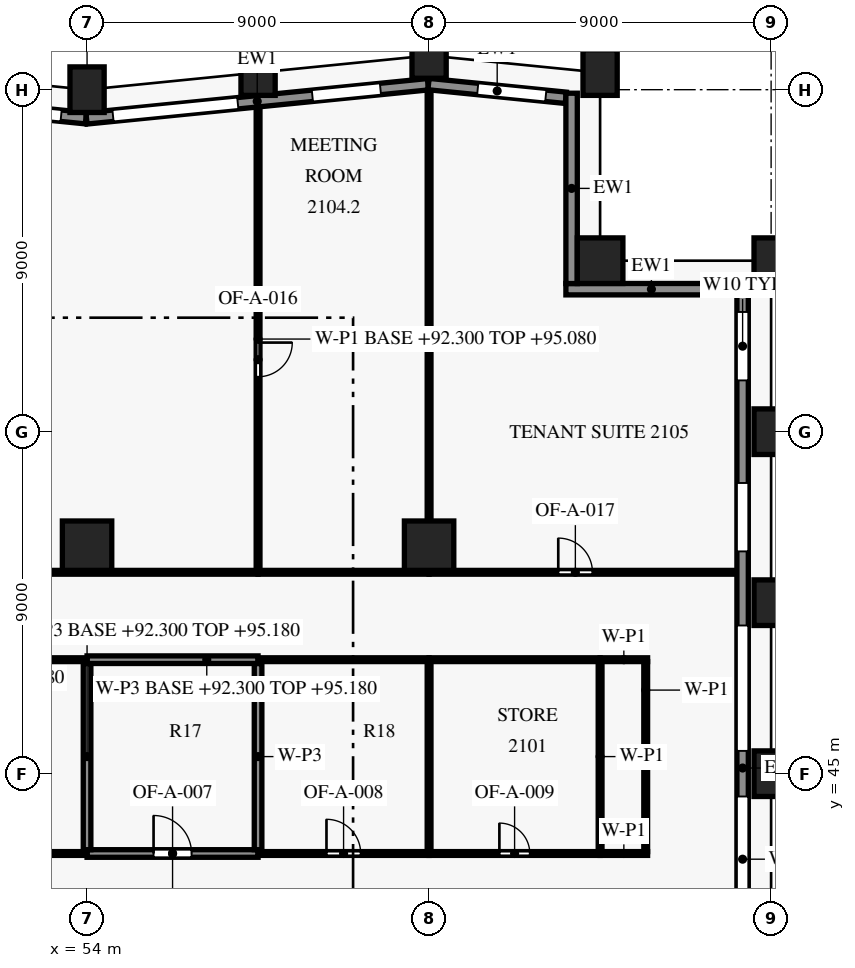
"""IFC4 building model, lengths in metres.
Left out: names, types, materials, properties, quantities, classifications, styles, units other than length and angle.
Written with IfcOpenShell. Run it as: python <this file> out.ifc"""

import sys

from ifc_helpers import new_model, si_unit, direction, frame, frame_2d, origin, origin_2d, place, context, subcontext, project, spatial, rectangle, extrude, element, fill, save


model = new_model("IFC4")
c1 = context("Model", 3, precision=1e-05, world=origin(), true_north=direction((0.0, 1.0)))
c2 = subcontext(c1, "Body", "Model", "MODEL_VIEW")
j1 = project(units=[si_unit("LENGTHUNIT", "METRE"), si_unit("PLANEANGLEUNIT", "RADIAN")], contexts=[c1])
p1 = place(None, origin())
s1 = spatial("IfcSite", under=j1, at=p1, CompositionType="ELEMENT")
p2 = place(p1, origin())
s2 = spatial("IfcBuilding", under=s1, at=p2, CompositionType="ELEMENT")
p3 = place(p2, frame((0.0, 0.0, 92.3)))
s3 = spatial("IfcBuildingStorey", under=s2, at=p3, CompositionType="ELEMENT", Elevation=92.3)
for number, where, z_axis, x_axis in (
    (1, (72.0, 45.0, 0.0), (0.0, 0.0, 1.0), (0.0, 1.0, 0.0)),
    (2, (72.0, 49.5, 0.0), (0.0, 0.0, 1.0), (0.0, 1.0, 0.0)),
    (3, (72.0, 54.0, 0.0), (0.0, 0.0, 1.0), (0.0, 1.0, 0.0)),
    (4, (72.0, 58.5, 0.0), (0.0, 0.0, 1.0), (0.0, 1.0, 0.0)),
    (5, (67.5, 63.45, 0.0), (0.0, 0.0, 1.0), (-0.995, 0.1, 0.0)),
    (6, (63.0, 63.9, 0.0), (0.0, 0.0, 1.0), (-1.0, 0.0, 0.0)),
    (7, (58.5, 63.45, 0.0), (0.0, 0.0, 1.0), (-0.995, -0.1, 0.0)),
    (8, (54.0, 63.0, 0.0), (0.0, 0.0, 1.0), (-1.0, 0.0, 0.0)),
):
    element("IfcColumn", number, at=place(p3, frame(where, z_axis=z_axis, x_axis=x_axis)), inside=s3, PredefinedType="COLUMN", context=c2, shape_type="SweptSolid", body=[
        extrude(rectangle(XDim=0.9, YDim=1.2, at=origin_2d()), origin(), (0.0, 0.0, 1.0), 3.8),
    ])
p4 = place(p3, frame((67.5, 58.5, 0.0), z_axis=(0.0, 0.0, 1.0), x_axis=(1.0, 0.0, 0.0)))
e9 = element("IfcColumn", 9, at=p4, inside=s3, PredefinedType="COLUMN", context=c2, shape_type="SweptSolid", body=[
    extrude(rectangle(XDim=1.2, YDim=1.2, at=origin_2d()), origin(), (0.0, 0.0, 1.0), 3.8),
])
for number, where, z_axis, x_axis in (
    (10, (54.0, 51.0, 0.0), (0.0, 0.0, 1.0), (1.0, 0.0, 0.0)),
    (11, (63.0, 51.0, 0.0), (0.0, 0.0, 1.0), (1.0, 0.0, 0.0)),
):
    element("IfcColumn", number, at=place(p3, frame(where, z_axis=z_axis, x_axis=x_axis)), inside=s3, PredefinedType="COLUMN", context=c2, shape_type="SweptSolid", body=[
        extrude(rectangle(XDim=1.3, YDim=1.3, at=origin_2d()), origin(), (0.0, 0.0, 1.0), 3.8),
    ])
p5 = place(p3, frame((71.25, 57.9, 0.0), z_axis=(0.0, 0.0, 1.0), x_axis=(0.0, -1.0, 0.0)))
e12 = element("IfcWall", 12, at=p5, inside=s3, PredefinedType="SOLIDWALL", context=c2, shape_type="SweptSolid", body=[
    extrude(rectangle(XDim=25.502, YDim=0.3, at=frame_2d((12.751, 0.0))), origin(), (0.0, 0.0, 1.0), 3.15),
])
p6 = place(p5, frame((0.75, 0.0, 0.75)))
e13 = element("IfcOpeningElement", 13, at=p6, cuts=e12, PredefinedType="OPENING", context=c2, shape_type="SweptSolid", body=[
    extrude(rectangle(XDim=1.8, YDim=1.8, at=frame_2d((0.9, 0.9))), frame((0.0, 0.16, 0.0), z_axis=(0.0, -1.0, 0.0), x_axis=(1.0, 0.0, 0.0)), (0.0, 0.0, 1.0), 0.32),
])
p7 = place(p5, frame((5.25, 0.0, 0.75)))
e14 = element("IfcOpeningElement", 14, at=p7, cuts=e12, PredefinedType="OPENING", context=c2, shape_type="SweptSolid", body=[
    extrude(rectangle(XDim=1.8, YDim=1.8, at=frame_2d((0.9, 0.9))), frame((0.0, 0.16, 0.0), z_axis=(0.0, -1.0, 0.0), x_axis=(1.0, 0.0, 0.0)), (0.0, 0.0, 1.0), 0.32),
])
p8 = place(p5, frame((9.0, 0.0, 0.15)))
e15 = element("IfcOpeningElement", 15, at=p8, cuts=e12, PredefinedType="OPENING", context=c2, shape_type="SweptSolid", body=[
    extrude(rectangle(XDim=3.3, YDim=2.4, at=frame_2d((1.65, 1.2))), frame((0.0, 0.16, 0.0), z_axis=(0.0, -1.0, 0.0), x_axis=(1.0, 0.0, 0.0)), (0.0, 0.0, 1.0), 0.32),
])
p9 = place(p5, frame((13.5, 0.0, 0.15)))
e16 = element("IfcOpeningElement", 16, at=p9, cuts=e12, PredefinedType="OPENING", context=c2, shape_type="SweptSolid", body=[
    extrude(rectangle(XDim=3.3, YDim=2.4, at=frame_2d((1.65, 1.2))), frame((0.0, 0.16, 0.0), z_axis=(0.0, -1.0, 0.0), x_axis=(1.0, 0.0, 0.0)), (0.0, 0.0, 1.0), 0.32),
])
p10 = place(p5, frame((18.75, 0.0, 0.75)))
e17 = element("IfcOpeningElement", 17, at=p10, cuts=e12, PredefinedType="OPENING", context=c2, shape_type="SweptSolid", body=[
    extrude(rectangle(XDim=1.8, YDim=1.8, at=frame_2d((0.9, 0.9))), frame((0.0, 0.16, 0.0), z_axis=(0.0, -1.0, 0.0), x_axis=(1.0, 0.0, 0.0)), (0.0, 0.0, 1.0), 0.32),
])
p11 = place(p5, frame((23.25, 0.0, 0.75)))
e18 = element("IfcOpeningElement", 18, at=p11, cuts=e12, PredefinedType="OPENING", context=c2, shape_type="SweptSolid", body=[
    extrude(rectangle(XDim=1.8, YDim=1.8, at=frame_2d((0.9, 0.9))), frame((0.0, 0.16, 0.0), z_axis=(0.0, -1.0, 0.0), x_axis=(1.0, 0.0, 0.0)), (0.0, 0.0, 1.0), 0.32),
])
p12 = place(p3, frame((66.6, 57.75, 0.0), z_axis=(0.0, 0.0, 1.0), x_axis=(1.0, 0.0, 0.0)))
e19 = element("IfcWall", 19, at=p12, inside=s3, PredefinedType="SOLIDWALL", context=c2, shape_type="SweptSolid", body=[
    extrude(rectangle(XDim=4.5, YDim=0.3, at=frame_2d((2.25, 0.0))), origin(), (0.0, 0.0, 1.0), 3.15),
])
p13 = place(p3, frame((66.75, 62.907, 0.0), z_axis=(0.0, 0.0, 1.0), x_axis=(0.0, -1.0, 0.0)))
e20 = element("IfcWall", 20, at=p13, inside=s3, PredefinedType="SOLIDWALL", context=c2, shape_type="SweptSolid", body=[
    extrude(rectangle(XDim=5.009, YDim=0.3, at=frame_2d((2.504, 0.0))), origin(), (0.0, 0.0, 1.0), 3.15),
])
p14 = place(p3, frame((62.985, 63.148, 0.0), z_axis=(0.0, 0.0, 1.0), x_axis=(0.995038521274, -0.099490407478, 0.0)))
e21 = element("IfcWall", 21, at=p14, inside=s3, PredefinedType="SOLIDWALL", context=c2, shape_type="SweptSolid", body=[
    extrude(rectangle(XDim=3.632, YDim=0.3, at=frame_2d((1.816, 0.0))), origin(), (0.0, 0.0, 1.0), 3.15),
])
p15 = place(p14, frame((1.301, 0.0, 0.75)))
e22 = element("IfcOpeningElement", 22, at=p15, cuts=e21, PredefinedType="OPENING", context=c2, shape_type="SweptSolid", body=[
    extrude(rectangle(XDim=1.8, YDim=1.8, at=frame_2d((0.9, 0.9))), frame((0.0, 0.16, 0.0), z_axis=(0.0, -1.0, 0.0), x_axis=(1.0, 0.0, 0.0)), (0.0, 0.0, 1.0), 0.32),
])
p16 = place(p3, frame((53.985, 62.245, 0.0), z_axis=(0.0, 0.0, 1.0), x_axis=(0.995037993253, 0.099495688264, 0.0)))
e23 = element("IfcWall", 23, at=p16, inside=s3, PredefinedType="SOLIDWALL", context=c2, shape_type="SweptSolid", body=[
    extrude(rectangle(XDim=9.03, YDim=0.3, at=frame_2d((4.515, 0.0))), origin(), (0.0, 0.0, 1.0), 3.15),
])
p17 = place(p16, frame((0.701, 0.0, 0.15)))
e24 = element("IfcOpeningElement", 24, at=p17, cuts=e23, PredefinedType="OPENING", context=c2, shape_type="SweptSolid", body=[
    extrude(rectangle(XDim=3.3, YDim=2.4, at=frame_2d((1.65, 1.2))), frame((0.0, 0.16, 0.0), z_axis=(0.0, -1.0, 0.0), x_axis=(1.0, 0.0, 0.0)), (0.0, 0.0, 1.0), 0.32),
])
p18 = place(p16, frame((5.974, 0.0, 0.75)))
e25 = element("IfcOpeningElement", 25, at=p18, cuts=e23, PredefinedType="OPENING", context=c2, shape_type="SweptSolid", body=[
    extrude(rectangle(XDim=1.8, YDim=1.8, at=frame_2d((0.9, 0.9))), frame((0.0, 0.16, 0.0), z_axis=(0.0, -1.0, 0.0), x_axis=(1.0, 0.0, 0.0)), (0.0, 0.0, 1.0), 0.32),
])
p19 = place(p3, frame((44.985, 63.148, 0.0), z_axis=(0.0, 0.0, 1.0), x_axis=(0.995037993253, -0.099495688264, 0.0)))
e26 = element("IfcWall", 26, at=p19, inside=s3, PredefinedType="SOLIDWALL", context=c2, shape_type="SweptSolid", body=[
    extrude(rectangle(XDim=9.03, YDim=0.3, at=frame_2d((4.515, 0.0))), origin(), (0.0, 0.0, 1.0), 3.15),
])
p20 = place(p19, frame((1.301, 0.0, 0.75)))
e27 = element("IfcOpeningElement", 27, at=p20, cuts=e26, PredefinedType="OPENING", context=c2, shape_type="SweptSolid", body=[
    extrude(rectangle(XDim=1.8, YDim=1.8, at=frame_2d((0.9, 0.9))), frame((0.0, 0.16, 0.0), z_axis=(0.0, -1.0, 0.0), x_axis=(1.0, 0.0, 0.0)), (0.0, 0.0, 1.0), 0.32),
])
p21 = place(p19, frame((5.073, 0.0, 0.15)))
e28 = element("IfcOpeningElement", 28, at=p21, cuts=e26, PredefinedType="OPENING", context=c2, shape_type="SweptSolid", body=[
    extrude(rectangle(XDim=3.3, YDim=2.4, at=frame_2d((1.65, 1.2))), frame((0.0, 0.16, 0.0), z_axis=(0.0, -1.0, 0.0), x_axis=(1.0, 0.0, 0.0)), (0.0, 0.0, 1.0), 0.32),
])
p22 = place(p3, frame((51.3, 42.9, 0.0), z_axis=(0.0, 0.0, 1.0), x_axis=(1.0, 0.0, 0.0)))
e29 = element("IfcWall", 29, at=p22, inside=s3, PredefinedType="PARTITIONING", context=c2, shape_type="SweptSolid", body=[
    extrude(rectangle(XDim=2.7, YDim=0.1, at=frame_2d((1.35, 0.0))), origin(), (0.0, 0.0, 1.0), 2.78),
])
p23 = place(p3, frame((54.0, 42.9, 0.0), z_axis=(0.0, 0.0, 1.0), x_axis=(1.0, 0.0, 0.0)))
e30 = element("IfcWall", 30, at=p23, inside=s3, PredefinedType="PARTITIONING", context=c2, shape_type="SweptSolid", body=[
    extrude(rectangle(XDim=4.5, YDim=0.2, at=frame_2d((2.25, 0.0))), origin(), (0.0, 0.0, 1.0), 2.88),
])
p24 = place(p23, frame((1.75, 0.0, 0.0)))
e31 = element("IfcOpeningElement", 31, at=p24, cuts=e30, PredefinedType="OPENING", context=c2, shape_type="SweptSolid", body=[
    extrude(rectangle(XDim=1.0, YDim=2.1, at=frame_2d((0.5, 1.05))), frame((0.0, 0.11, 0.0), z_axis=(0.0, -1.0, 0.0), x_axis=(1.0, 0.0, 0.0)), (0.0, 0.0, 1.0), 0.22),
])
p25 = place(p3, frame((58.5, 42.9, 0.0), z_axis=(0.0, 0.0, 1.0), x_axis=(1.0, 0.0, 0.0)))
e32 = element("IfcWall", 32, at=p25, inside=s3, PredefinedType="PARTITIONING", context=c2, shape_type="SweptSolid", body=[
    extrude(rectangle(XDim=4.5, YDim=0.1, at=frame_2d((2.25, 0.0))), origin(), (0.0, 0.0, 1.0), 2.88),
])
p26 = place(p25, frame((1.8, 0.0, 0.0)))
e33 = element("IfcOpeningElement", 33, at=p26, cuts=e32, PredefinedType="OPENING", context=c2, shape_type="SweptSolid", body=[
    extrude(rectangle(XDim=0.9, YDim=2.1, at=frame_2d((0.45, 1.05))), frame((0.0, 0.06, 0.0), z_axis=(0.0, -1.0, 0.0), x_axis=(1.0, 0.0, 0.0)), (0.0, 0.0, 1.0), 0.12),
])
p27 = place(p3, frame((63.0, 42.9, 0.0), z_axis=(0.0, 0.0, 1.0), x_axis=(1.0, 0.0, 0.0)))
e34 = element("IfcWall", 34, at=p27, inside=s3, PredefinedType="PARTITIONING", context=c2, shape_type="SweptSolid", body=[
    extrude(rectangle(XDim=4.5, YDim=0.1, at=frame_2d((2.25, 0.0))), origin(), (0.0, 0.0, 1.0), 2.88),
])
p28 = place(p27, frame((1.85, 0.0, 0.0)))
e35 = element("IfcOpeningElement", 35, at=p28, cuts=e34, PredefinedType="OPENING", context=c2, shape_type="SweptSolid", body=[
    extrude(rectangle(XDim=0.8, YDim=2.1, at=frame_2d((0.4, 1.05))), frame((0.0, 0.06, 0.0), z_axis=(0.0, -1.0, 0.0), x_axis=(1.0, 0.0, 0.0)), (0.0, 0.0, 1.0), 0.12),
])
p29 = place(p3, frame((67.5, 42.9, 0.0), z_axis=(0.0, 0.0, 1.0), x_axis=(1.0, 0.0, 0.0)))
e36 = element("IfcWall", 36, at=p29, inside=s3, PredefinedType="PARTITIONING", context=c2, shape_type="SweptSolid", body=[
    extrude(rectangle(XDim=1.25, YDim=0.1, at=frame_2d((0.625, 0.0))), origin(), (0.0, 0.0, 1.0), 3.48),
])
p30 = place(p3, frame((68.7, 42.95, 0.0), z_axis=(0.0, 0.0, 1.0), x_axis=(0.0, 1.0, 0.0)))
e37 = element("IfcWall", 37, at=p30, inside=s3, PredefinedType="PARTITIONING", context=c2, shape_type="SweptSolid", body=[
    extrude(rectangle(XDim=5.0, YDim=0.1, at=frame_2d((2.5, 0.0))), origin(), (0.0, 0.0, 1.0), 3.48),
])
p31 = place(p3, frame((54.0, 43.0, 0.0), z_axis=(0.0, 0.0, 1.0), x_axis=(0.0, 1.0, 0.0)))
e38 = element("IfcWall", 38, at=p31, inside=s3, PredefinedType="PARTITIONING", context=c2, shape_type="SweptSolid", body=[
    extrude(rectangle(XDim=4.9, YDim=0.2, at=frame_2d((2.45, 0.0))), origin(), (0.0, 0.0, 1.0), 2.88),
])
p32 = place(p3, frame((58.5, 47.9, 0.0), z_axis=(0.0, 0.0, 1.0), x_axis=(0.0, -1.0, 0.0)))
e39 = element("IfcWall", 39, at=p32, inside=s3, PredefinedType="PARTITIONING", context=c2, shape_type="SweptSolid", body=[
    extrude(rectangle(XDim=4.9, YDim=0.2, at=frame_2d((2.45, 0.0))), origin(), (0.0, 0.0, 1.0), 3.48),
])
p33 = place(p3, frame((63.0, 47.95, 0.0), z_axis=(0.0, 0.0, 1.0), x_axis=(0.0, -1.0, 0.0)))
e40 = element("IfcWall", 40, at=p33, inside=s3, PredefinedType="PARTITIONING", context=c2, shape_type="SweptSolid", body=[
    extrude(rectangle(XDim=5.0, YDim=0.1, at=frame_2d((2.5, 0.0))), origin(), (0.0, 0.0, 1.0), 2.88),
])
p34 = place(p3, frame((67.5, 47.95, 0.0), z_axis=(0.0, 0.0, 1.0), x_axis=(0.0, -1.0, 0.0)))
e41 = element("IfcWall", 41, at=p34, inside=s3, PredefinedType="PARTITIONING", context=c2, shape_type="SweptSolid", body=[
    extrude(rectangle(XDim=5.0, YDim=0.1, at=frame_2d((2.5, 0.0))), origin(), (0.0, 0.0, 1.0), 3.48),
])
p35 = place(p3, frame((54.0, 48.0, 0.0), z_axis=(0.0, 0.0, 1.0), x_axis=(-1.0, 0.0, 0.0)))
e42 = element("IfcWall", 42, at=p35, inside=s3, PredefinedType="PARTITIONING", context=c2, shape_type="SweptSolid", body=[
    extrude(rectangle(XDim=9.0, YDim=0.1, at=frame_2d((4.5, 0.0))), origin(), (0.0, 0.0, 1.0), 2.88),
])
p36 = place(p3, frame((58.5, 48.0, 0.0), z_axis=(0.0, 0.0, 1.0), x_axis=(-1.0, 0.0, 0.0)))
e43 = element("IfcWall", 43, at=p36, inside=s3, PredefinedType="PARTITIONING", context=c2, shape_type="SweptSolid", body=[
    extrude(rectangle(XDim=4.5, YDim=0.2, at=frame_2d((2.25, 0.0))), origin(), (0.0, 0.0, 1.0), 2.88),
])
for number, where, z_axis, x_axis in (
    (44, (63.0, 48.0, 0.0), (0.0, 0.0, 1.0), (-1.0, 0.0, 0.0)),
    (45, (67.5, 48.0, 0.0), (0.0, 0.0, 1.0), (-1.0, 0.0, 0.0)),
):
    element("IfcWall", number, at=place(p3, frame(where, z_axis=z_axis, x_axis=x_axis)), inside=s3, PredefinedType="PARTITIONING", context=c2, shape_type="SweptSolid", body=[
        extrude(rectangle(XDim=4.5, YDim=0.1, at=frame_2d((2.25, 0.0))), origin(), (0.0, 0.0, 1.0), 2.88),
    ])
p37 = place(p3, frame((68.75, 48.0, 0.0), z_axis=(0.0, 0.0, 1.0), x_axis=(-1.0, 0.0, 0.0)))
e46 = element("IfcWall", 46, at=p37, inside=s3, PredefinedType="PARTITIONING", context=c2, shape_type="SweptSolid", body=[
    extrude(rectangle(XDim=1.25, YDim=0.1, at=frame_2d((0.625, 0.0))), origin(), (0.0, 0.0, 1.0), 3.48),
])
p38 = place(p3, frame((45.0, 50.3, 0.0), z_axis=(0.0, 0.0, 1.0), x_axis=(1.0, 0.0, 0.0)))
e47 = element("IfcWall", 47, at=p38, inside=s3, PredefinedType="PARTITIONING", context=c2, shape_type="SweptSolid", body=[
    extrude(rectangle(XDim=13.5, YDim=0.1, at=frame_2d((6.75, 0.0))), origin(), (0.0, 0.0, 1.0), 2.88),
])
p39 = place(p38, frame((4.05, 0.0, 0.0)))
e48 = element("IfcOpeningElement", 48, at=p39, cuts=e47, PredefinedType="OPENING", context=c2, shape_type="SweptSolid", body=[
    extrude(rectangle(XDim=0.9, YDim=2.1, at=frame_2d((0.45, 1.05))), frame((0.0, 0.06, 0.0), z_axis=(0.0, -1.0, 0.0), x_axis=(1.0, 0.0, 0.0)), (0.0, 0.0, 1.0), 0.12),
])
p40 = place(p3, frame((58.5, 50.3, 0.0), z_axis=(0.0, 0.0, 1.0), x_axis=(1.0, 0.0, 0.0)))
e49 = element("IfcWall", 49, at=p40, inside=s3, PredefinedType="PARTITIONING", context=c2, shape_type="SweptSolid", body=[
    extrude(rectangle(XDim=4.5, YDim=0.1, at=frame_2d((2.25, 0.0))), origin(), (0.0, 0.0, 1.0), 2.88),
])
p41 = place(p3, frame((63.0, 50.3, 0.0), z_axis=(0.0, 0.0, 1.0), x_axis=(1.0, 0.0, 0.0)))
e50 = element("IfcWall", 50, at=p41, inside=s3, PredefinedType="PARTITIONING", context=c2, shape_type="SweptSolid", body=[
    extrude(rectangle(XDim=8.08, YDim=0.1, at=frame_2d((4.04, 0.0))), origin(), (0.0, 0.0, 1.0), 2.88),
])
p42 = place(p41, frame((3.399, 0.0, 0.0)))
e51 = element("IfcOpeningElement", 51, at=p42, cuts=e50, PredefinedType="OPENING", context=c2, shape_type="SweptSolid", body=[
    extrude(rectangle(XDim=0.9, YDim=2.1, at=frame_2d((0.45, 1.05))), frame((0.0, 0.06, 0.0), z_axis=(0.0, -1.0, 0.0), x_axis=(1.0, 0.0, 0.0)), (0.0, 0.0, 1.0), 0.12),
])
p43 = place(p3, frame((58.5, 62.525, 0.0), z_axis=(0.0, 0.0, 1.0), x_axis=(0.0, -1.0, 0.0)))
e52 = element("IfcWall", 52, at=p43, inside=s3, PredefinedType="PARTITIONING", context=c2, shape_type="SweptSolid", body=[
    extrude(rectangle(XDim=12.175, YDim=0.1, at=frame_2d((6.088, 0.0))), origin(), (0.0, 0.0, 1.0), 2.78),
])
p44 = place(p43, frame((6.18, 0.0, 0.0)))
e53 = element("IfcOpeningElement", 53, at=p44, cuts=e52, PredefinedType="OPENING", context=c2, shape_type="SweptSolid", body=[
    extrude(rectangle(XDim=0.9, YDim=2.1, at=frame_2d((0.45, 1.05))), frame((0.0, 0.06, 0.0), z_axis=(0.0, -1.0, 0.0), x_axis=(1.0, 0.0, 0.0)), (0.0, 0.0, 1.0), 0.12),
])
p45 = place(p3, frame((63.0, 62.976, 0.0), z_axis=(0.0, 0.0, 1.0), x_axis=(0.0, -1.0, 0.0)))
e54 = element("IfcWall", 54, at=p45, inside=s3, PredefinedType="PARTITIONING", context=c2, shape_type="SweptSolid", body=[
    extrude(rectangle(XDim=11.321, YDim=0.1, at=frame_2d((5.66, 0.0))), origin(), (0.0, 0.0, 1.0), 2.88),
])
p46 = place(p6, origin())
e55 = element("IfcWindow", 55, at=p46, inside=s3, PartitioningType="SINGLE_PANEL", PredefinedType="WINDOW", context=c2, shape_type="SweptSolid", body=[
    extrude(rectangle(XDim=1.8, YDim=1.8, at=frame_2d((0.9, 0.9))), frame((0.0, 0.03, 0.0), z_axis=(0.0, -1.0, 0.0), x_axis=(1.0, 0.0, 0.0)), (0.0, 0.0, 1.0), 0.06),
])
fill(e13, e55)
p47 = place(p7, origin())
e56 = element("IfcWindow", 56, at=p47, inside=s3, PartitioningType="SINGLE_PANEL", PredefinedType="WINDOW", context=c2, shape_type="SweptSolid", body=[
    extrude(rectangle(XDim=1.8, YDim=1.8, at=frame_2d((0.9, 0.9))), frame((0.0, 0.03, 0.0), z_axis=(0.0, -1.0, 0.0), x_axis=(1.0, 0.0, 0.0)), (0.0, 0.0, 1.0), 0.06),
])
fill(e14, e56)
p48 = place(p8, origin())
e57 = element("IfcWindow", 57, at=p48, inside=s3, PartitioningType="SINGLE_PANEL", PredefinedType="WINDOW", context=c2, shape_type="SweptSolid", body=[
    extrude(rectangle(XDim=3.3, YDim=2.4, at=frame_2d((1.65, 1.2))), frame((0.0, 0.03, 0.0), z_axis=(0.0, -1.0, 0.0), x_axis=(1.0, 0.0, 0.0)), (0.0, 0.0, 1.0), 0.06),
])
fill(e15, e57)
p49 = place(p9, origin())
e58 = element("IfcWindow", 58, at=p49, inside=s3, PartitioningType="SINGLE_PANEL", PredefinedType="WINDOW", context=c2, shape_type="SweptSolid", body=[
    extrude(rectangle(XDim=3.3, YDim=2.4, at=frame_2d((1.65, 1.2))), frame((0.0, 0.03, 0.0), z_axis=(0.0, -1.0, 0.0), x_axis=(1.0, 0.0, 0.0)), (0.0, 0.0, 1.0), 0.06),
])
fill(e16, e58)
p50 = place(p15, origin())
e59 = element("IfcWindow", 59, at=p50, inside=s3, PartitioningType="SINGLE_PANEL", PredefinedType="WINDOW", context=c2, shape_type="SweptSolid", body=[
    extrude(rectangle(XDim=1.8, YDim=1.8, at=frame_2d((0.9, 0.9))), frame((0.0, 0.03, 0.0), z_axis=(0.0, -1.0, 0.0), x_axis=(1.0, 0.0, 0.0)), (0.0, 0.0, 1.0), 0.06),
])
fill(e22, e59)
p51 = place(p17, origin())
e60 = element("IfcWindow", 60, at=p51, inside=s3, PartitioningType="SINGLE_PANEL", PredefinedType="WINDOW", context=c2, shape_type="SweptSolid", body=[
    extrude(rectangle(XDim=3.3, YDim=2.4, at=frame_2d((1.65, 1.2))), frame((0.0, 0.03, 0.0), z_axis=(0.0, -1.0, 0.0), x_axis=(1.0, 0.0, 0.0)), (0.0, 0.0, 1.0), 0.06),
])
fill(e24, e60)
p52 = place(p18, origin())
e61 = element("IfcWindow", 61, at=p52, inside=s3, PartitioningType="SINGLE_PANEL", PredefinedType="WINDOW", context=c2, shape_type="SweptSolid", body=[
    extrude(rectangle(XDim=1.8, YDim=1.8, at=frame_2d((0.9, 0.9))), frame((0.0, 0.03, 0.0), z_axis=(0.0, -1.0, 0.0), x_axis=(1.0, 0.0, 0.0)), (0.0, 0.0, 1.0), 0.06),
])
fill(e25, e61)
p53 = place(p21, origin())
e62 = element("IfcWindow", 62, at=p53, inside=s3, PartitioningType="SINGLE_PANEL", PredefinedType="WINDOW", context=c2, shape_type="SweptSolid", body=[
    extrude(rectangle(XDim=3.3, YDim=2.4, at=frame_2d((1.65, 1.2))), frame((0.0, 0.03, 0.0), z_axis=(0.0, -1.0, 0.0), x_axis=(1.0, 0.0, 0.0)), (0.0, 0.0, 1.0), 0.06),
])
fill(e28, e62)
p54 = place(p24, origin())
e63 = element("IfcDoor", 63, at=p54, inside=s3, OperationType="SINGLE_SWING_RIGHT", PredefinedType="DOOR", context=c2, shape_type="SweptSolid", body=[
    extrude(rectangle(XDim=1.0, YDim=2.1, at=frame_2d((0.5, 1.05))), frame((0.0, 0.025, 0.0), z_axis=(0.0, -1.0, 0.0), x_axis=(1.0, 0.0, 0.0)), (0.0, 0.0, 1.0), 0.05),
])
fill(e31, e63)
p55 = place(p26, origin())
e64 = element("IfcDoor", 64, at=p55, inside=s3, OperationType="SINGLE_SWING_LEFT", PredefinedType="DOOR", context=c2, shape_type="SweptSolid", body=[
    extrude(rectangle(XDim=0.9, YDim=2.1, at=frame_2d((0.45, 1.05))), frame((0.0, 0.025, 0.0), z_axis=(0.0, -1.0, 0.0), x_axis=(1.0, 0.0, 0.0)), (0.0, 0.0, 1.0), 0.05),
])
fill(e33, e64)
p56 = place(p28, origin())
e65 = element("IfcDoor", 65, at=p56, inside=s3, OperationType="SINGLE_SWING_RIGHT", PredefinedType="DOOR", context=c2, shape_type="SweptSolid", body=[
    extrude(rectangle(XDim=0.8, YDim=2.1, at=frame_2d((0.4, 1.05))), frame((0.0, 0.025, 0.0), z_axis=(0.0, -1.0, 0.0), x_axis=(1.0, 0.0, 0.0)), (0.0, 0.0, 1.0), 0.05),
])
fill(e35, e65)
p57 = place(p44, origin())
e66 = element("IfcDoor", 66, at=p57, inside=s3, OperationType="SINGLE_SWING_LEFT", PredefinedType="DOOR", context=c2, shape_type="SweptSolid", body=[
    extrude(rectangle(XDim=0.9, YDim=2.1, at=frame_2d((0.45, 1.05))), frame((0.0, 0.025, 0.0), z_axis=(0.0, -1.0, 0.0), x_axis=(1.0, 0.0, 0.0)), (0.0, 0.0, 1.0), 0.05),
])
fill(e53, e66)
p58 = place(p42, origin())
e67 = element("IfcDoor", 67, at=p58, inside=s3, OperationType="SINGLE_SWING_LEFT", PredefinedType="DOOR", context=c2, shape_type="SweptSolid", body=[
    extrude(rectangle(XDim=0.9, YDim=2.1, at=frame_2d((0.45, 1.05))), frame((0.0, 0.025, 0.0), z_axis=(0.0, -1.0, 0.0), x_axis=(1.0, 0.0, 0.0)), (0.0, 0.0, 1.0), 0.05),
])
fill(e51, e67)
save(model, sys.argv[1])
